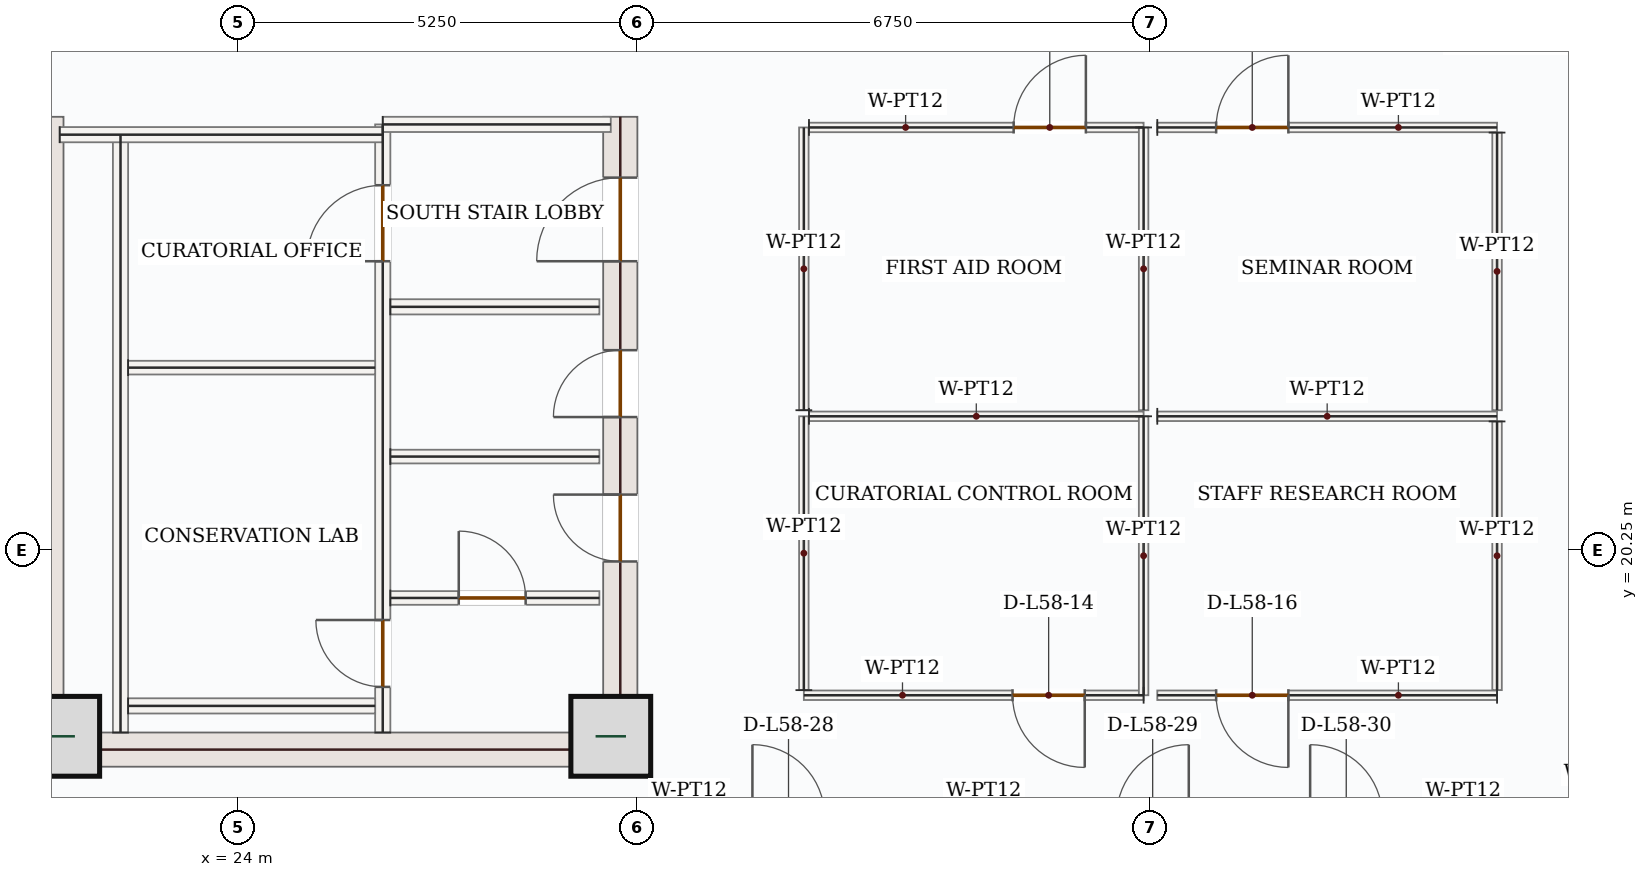
"""IFC4 building model, lengths in metres.
Left out: names, types, materials, properties, quantities, classifications, styles, units other than length and angle.
Written with IfcOpenShell. Run it as: python <this file> out.ifc"""

import sys

from ifc_helpers import new_model, si_unit, direction, frame, frame_2d, origin, origin_2d, place, context, subcontext, project, spatial, rectangle, extrude, source, transform, mapped, element, fill, save


model = new_model("IFC4")
c1 = context("Model", 3, precision=1e-05, world=origin(), true_north=direction((0.0, 1.0)))
c2 = subcontext(c1, "Body", "Model", "MODEL_VIEW")
j1 = project(units=[si_unit("LENGTHUNIT", "METRE"), si_unit("PLANEANGLEUNIT", "RADIAN")], contexts=[c1])
p1 = place(None, origin())
s1 = spatial("IfcSite", under=j1, at=p1, CompositionType="ELEMENT")
p2 = place(p1, origin())
s2 = spatial("IfcBuilding", under=s1, at=p2, CompositionType="ELEMENT")
p3 = place(p2, frame((0.0, 0.0, 246.6)))
s3 = spatial("IfcBuildingStorey", under=s2, at=p3, CompositionType="ELEMENT", Elevation=246.6)
m1 = source(origin(), c2, "Body", "SweptSolid", [
    extrude(rectangle(XDim=8.55, YDim=0.45, at=frame_2d((4.275, 0.0))), origin(), (0.0, 0.0, 1.0), 3.5),
])
p4 = place(p3, frame((21.475, 17.4, 0.0), z_axis=(0.0, 0.0, 1.0), x_axis=(0.0, 1.0, 0.0)))
e1 = element("IfcWall", 1, at=p4, inside=s3, PredefinedType="SHEAR", context=c2, shape_type="MappedRepresentation", body=[
    mapped(m1, transform((0.0, 0.0, 0.0), x_axis=(1.0, 0.0, 0.0), y_axis=(0.0, 1.0, 0.0), z_axis=(0.0, 0.0, 1.0), scale=1.0)),
])
p5 = place(p3, frame((29.025, 17.4, 0.0), z_axis=(0.0, 0.0, 1.0), x_axis=(0.0, 1.0, 0.0)))
e2 = element("IfcWall", 2, at=p5, inside=s3, PredefinedType="SHEAR", context=c2, shape_type="SweptSolid", body=[
    extrude(rectangle(XDim=8.55, YDim=0.45, at=frame_2d((4.275, 0.0))), origin(), (0.0, 0.0, 1.0), 3.5),
])
p6 = place(p5, frame((6.65, 0.0, 0.0)))
e3 = element("IfcOpeningElement", 3, at=p6, cuts=e2, PredefinedType="OPENING", context=c2, shape_type="SweptSolid", body=[
    extrude(rectangle(XDim=1.1, YDim=2.2, at=frame_2d((0.55, 1.1))), frame((0.0, 0.235, 0.0), z_axis=(0.0, -1.0, 0.0), x_axis=(1.0, 0.0, 0.0)), (0.0, 0.0, 1.0), 0.47),
])
p7 = place(p5, frame((2.7, 0.0, 0.0)))
e4 = element("IfcOpeningElement", 4, at=p7, cuts=e2, PredefinedType="OPENING", context=c2, shape_type="SweptSolid", body=[
    extrude(rectangle(XDim=0.88, YDim=2.1, at=frame_2d((0.44, 1.05))), frame((0.0, 0.235, 0.0), z_axis=(0.0, -1.0, 0.0), x_axis=(1.0, 0.0, 0.0)), (0.0, 0.0, 1.0), 0.47),
])
p8 = place(p5, frame((4.6, 0.0, 0.0)))
e5 = element("IfcOpeningElement", 5, at=p8, cuts=e2, PredefinedType="OPENING", context=c2, shape_type="SweptSolid", body=[
    extrude(rectangle(XDim=0.88, YDim=2.1, at=frame_2d((0.44, 1.05))), frame((0.0, 0.235, 0.0), z_axis=(0.0, -1.0, 0.0), x_axis=(1.0, 0.0, 0.0)), (0.0, 0.0, 1.0), 0.47),
])
m2 = source(origin(), c2, "Body", "SweptSolid", [
    extrude(rectangle(XDim=7.1, YDim=0.45, at=frame_2d((3.55, 0.0))), origin(), (0.0, 0.0, 1.0), 3.5),
])
p9 = place(p3, frame((21.7, 17.625, 0.0), z_axis=(0.0, 0.0, 1.0), x_axis=(1.0, 0.0, 0.0)))
e6 = element("IfcWall", 6, at=p9, inside=s3, PredefinedType="SHEAR", context=c2, shape_type="MappedRepresentation", body=[
    mapped(m2, transform((0.0, 0.0, 0.0), x_axis=(1.0, 0.0, 0.0), y_axis=(0.0, 1.0, 0.0), z_axis=(0.0, 0.0, 1.0), scale=1.0)),
])
m3 = source(origin(), c2, "Body", "SweptSolid", [
    extrude(rectangle(XDim=1.05, YDim=1.05, at=origin_2d()), origin(), (0.0, 0.0, 1.0), 3.75),
])
for number, where, z_axis, x_axis in (
    (7, (21.65, 17.8, 0.0), (0.0, 0.0, 1.0), (1.0, 0.0, 0.0)),
    (8, (28.9, 17.8, 0.0), (0.0, 0.0, 1.0), (1.0, 0.0, 0.0)),
):
    element("IfcColumn", number, at=place(p3, frame(where, z_axis=z_axis, x_axis=x_axis)), inside=s3, PredefinedType="COLUMN", context=c2, shape_type="MappedRepresentation", body=[
        mapped(m3, transform((0.0, 0.0, 0.0), x_axis=(1.0, 0.0, 0.0), y_axis=(0.0, 1.0, 0.0), z_axis=(0.0, 0.0, 1.0), scale=1.0)),
    ])
m4 = source(origin(), c2, "Body", "SweptSolid", [
    extrude(rectangle(XDim=7.87, YDim=0.2, at=frame_2d((3.935, 0.0))), origin(), (0.0, 0.0, 1.0), 3.5),
])
p10 = place(p3, frame((22.45, 17.85, 0.0), z_axis=(0.0, 0.0, 1.0), x_axis=(0.0, 1.0, 0.0)))
e9 = element("IfcWall", 9, at=p10, inside=s3, PredefinedType="SOLIDWALL", context=c2, shape_type="MappedRepresentation", body=[
    mapped(m4, transform((0.0, 0.0, 0.0), x_axis=(1.0, 0.0, 0.0), y_axis=(0.0, 1.0, 0.0), z_axis=(0.0, 0.0, 1.0), scale=1.0)),
])
p11 = place(p3, frame((25.9, 17.85, 0.0), z_axis=(0.0, 0.0, 1.0), x_axis=(0.0, 1.0, 0.0)))
e10 = element("IfcWall", 10, at=p11, inside=s3, PredefinedType="SOLIDWALL", context=c2, shape_type="SweptSolid", body=[
    extrude(rectangle(XDim=8.0, YDim=0.2, at=frame_2d((4.0, 0.0))), origin(), (0.0, 0.0, 1.0), 3.5),
])
p12 = place(p11, frame((6.2, 0.0, 0.0)))
e11 = element("IfcOpeningElement", 11, at=p12, cuts=e10, PredefinedType="OPENING", context=c2, shape_type="SweptSolid", body=[
    extrude(rectangle(XDim=1.0, YDim=2.15, at=frame_2d((0.5, 1.075))), frame((0.0, 0.11, 0.0), z_axis=(0.0, -1.0, 0.0), x_axis=(1.0, 0.0, 0.0)), (0.0, 0.0, 1.0), 0.22),
])
p13 = place(p11, frame((0.6, 0.0, 0.0)))
e12 = element("IfcOpeningElement", 12, at=p13, cuts=e10, PredefinedType="OPENING", context=c2, shape_type="SweptSolid", body=[
    extrude(rectangle(XDim=0.88, YDim=2.1, at=frame_2d((0.44, 1.05))), frame((0.0, 0.11, 0.0), z_axis=(0.0, -1.0, 0.0), x_axis=(1.0, 0.0, 0.0)), (0.0, 0.0, 1.0), 0.22),
])
m5 = source(origin(), c2, "Body", "SweptSolid", [
    extrude(rectangle(XDim=4.25, YDim=0.2, at=frame_2d((2.125, 0.0))), origin(), (0.0, 0.0, 1.0), 3.5),
])
p14 = place(p3, frame((21.65, 25.715, 0.0), z_axis=(0.0, 0.0, 1.0), x_axis=(1.0, 0.0, 0.0)))
e13 = element("IfcWall", 13, at=p14, inside=s3, PredefinedType="SOLIDWALL", context=c2, shape_type="MappedRepresentation", body=[
    mapped(m5, transform((0.0, 0.0, 0.0), x_axis=(1.0, 0.0, 0.0), y_axis=(0.0, 1.0, 0.0), z_axis=(0.0, 0.0, 1.0), scale=1.0)),
])
m6 = source(origin(), c2, "Body", "SweptSolid", [
    extrude(rectangle(XDim=3.0, YDim=0.2, at=frame_2d((1.5, 0.0))), origin(), (0.0, 0.0, 1.0), 3.5),
])
p15 = place(p3, frame((25.9, 25.85, 0.0), z_axis=(0.0, 0.0, 1.0), x_axis=(1.0, 0.0, 0.0)))
e14 = element("IfcWall", 14, at=p15, inside=s3, PredefinedType="SOLIDWALL", context=c2, shape_type="MappedRepresentation", body=[
    mapped(m6, transform((0.0, 0.0, 0.0), x_axis=(1.0, 0.0, 0.0), y_axis=(0.0, 1.0, 0.0), z_axis=(0.0, 0.0, 1.0), scale=1.0)),
])
m7 = source(origin(), c2, "Body", "SweptSolid", [
    extrude(rectangle(XDim=3.25, YDim=0.2, at=frame_2d((1.625, 0.0))), origin(), (0.0, 0.0, 1.0), 3.5),
])
p16 = place(p3, frame((22.55, 18.2, 0.0), z_axis=(0.0, 0.0, 1.0), x_axis=(1.0, 0.0, 0.0)))
e15 = element("IfcWall", 15, at=p16, inside=s3, PredefinedType="SOLIDWALL", context=c2, shape_type="MappedRepresentation", body=[
    mapped(m7, transform((0.0, 0.0, 0.0), x_axis=(1.0, 0.0, 0.0), y_axis=(0.0, 1.0, 0.0), z_axis=(0.0, 0.0, 1.0), scale=1.0)),
])
m8 = source(origin(), c2, "Body", "SweptSolid", [
    extrude(rectangle(XDim=3.25, YDim=0.18, at=frame_2d((1.625, 0.0))), origin(), (0.0, 0.0, 1.0), 3.5),
])
p17 = place(p3, frame((22.55, 22.65, 0.0), z_axis=(0.0, 0.0, 1.0), x_axis=(1.0, 0.0, 0.0)))
e16 = element("IfcWall", 16, at=p17, inside=s3, PredefinedType="PARTITIONING", context=c2, shape_type="MappedRepresentation", body=[
    mapped(m8, transform((0.0, 0.0, 0.0), x_axis=(1.0, 0.0, 0.0), y_axis=(0.0, 1.0, 0.0), z_axis=(0.0, 0.0, 1.0), scale=1.0)),
])
m9 = source(origin(), c2, "Body", "SweptSolid", [
    extrude(rectangle(XDim=2.75, YDim=0.2, at=frame_2d((1.375, 0.0))), origin(), (0.0, 0.0, 1.0), 3.5),
])
p18 = place(p3, frame((26.0, 23.45, 0.0), z_axis=(0.0, 0.0, 1.0), x_axis=(1.0, 0.0, 0.0)))
e17 = element("IfcWall", 17, at=p18, inside=s3, PredefinedType="SOLIDWALL", context=c2, shape_type="MappedRepresentation", body=[
    mapped(m9, transform((0.0, 0.0, 0.0), x_axis=(1.0, 0.0, 0.0), y_axis=(0.0, 1.0, 0.0), z_axis=(0.0, 0.0, 1.0), scale=1.0)),
])
p19 = place(p3, frame((26.0, 19.62, 0.0), z_axis=(0.0, 0.0, 1.0), x_axis=(1.0, 0.0, 0.0)))
e18 = element("IfcWall", 18, at=p19, inside=s3, PredefinedType="PARTITIONING", context=c2, shape_type="SweptSolid", body=[
    extrude(rectangle(XDim=2.75, YDim=0.18, at=frame_2d((1.375, 0.0))), origin(), (0.0, 0.0, 1.0), 3.5),
])
p20 = place(p19, frame((0.9, 0.0, 0.0)))
e19 = element("IfcOpeningElement", 19, at=p20, cuts=e18, PredefinedType="OPENING", context=c2, shape_type="SweptSolid", body=[
    extrude(rectangle(XDim=0.88, YDim=2.1, at=frame_2d((0.44, 1.05))), frame((0.0, 0.1, 0.0), z_axis=(0.0, -1.0, 0.0), x_axis=(1.0, 0.0, 0.0)), (0.0, 0.0, 1.0), 0.2),
])
m10 = source(origin(), c2, "Body", "SweptSolid", [
    extrude(rectangle(XDim=2.75, YDim=0.18, at=frame_2d((1.375, 0.0))), origin(), (0.0, 0.0, 1.0), 3.5),
])
p21 = place(p3, frame((26.0, 21.48, 0.0), z_axis=(0.0, 0.0, 1.0), x_axis=(1.0, 0.0, 0.0)))
e20 = element("IfcWall", 20, at=p21, inside=s3, PredefinedType="PARTITIONING", context=c2, shape_type="MappedRepresentation", body=[
    mapped(m10, transform((0.0, 0.0, 0.0), x_axis=(1.0, 0.0, 0.0), y_axis=(0.0, 1.0, 0.0), z_axis=(0.0, 0.0, 1.0), scale=1.0)),
])
p22 = place(p3, frame((35.91, 18.34, 0.0), z_axis=(0.0, 0.0, 1.0), x_axis=(-1.0, 0.0, 0.0)))
e21 = element("IfcWall", 21, at=p22, inside=s3, PredefinedType="PARTITIONING", context=c2, shape_type="SweptSolid", body=[
    extrude(rectangle(XDim=4.47, YDim=0.125, at=frame_2d((2.235, 0.0))), origin(), (0.0, 0.0, 1.0), 3.5),
])
p23 = place(p22, frame((0.774, 0.0, 0.0)))
e22 = element("IfcOpeningElement", 22, at=p23, cuts=e21, PredefinedType="OPENING", context=c2, shape_type="SweptSolid", body=[
    extrude(rectangle(XDim=0.95, YDim=2.15, at=frame_2d((0.475, 1.075))), frame((0.0, 0.073, 0.0), z_axis=(0.0, -1.0, 0.0), x_axis=(1.0, 0.0, 0.0)), (0.0, 0.0, 1.0), 0.145),
])
m11 = source(origin(), c2, "Body", "SweptSolid", [
    extrude(rectangle(XDim=3.603, YDim=0.125, at=frame_2d((1.801, 0.0))), origin(), (0.0, 0.0, 1.0), 3.5),
])
p24 = place(p3, frame((31.44, 18.407, 0.0), z_axis=(0.0, 0.0, 1.0), x_axis=(0.0, 1.0, 0.0)))
e23 = element("IfcWall", 23, at=p24, inside=s3, PredefinedType="PARTITIONING", context=c2, shape_type="MappedRepresentation", body=[
    mapped(m11, transform((0.0, 0.0, 0.0), x_axis=(1.0, 0.0, 0.0), y_axis=(0.0, 1.0, 0.0), z_axis=(0.0, 0.0, 1.0), scale=1.0)),
])
m12 = source(origin(), c2, "Body", "SweptSolid", [
    extrude(rectangle(XDim=4.402, YDim=0.125, at=frame_2d((2.201, 0.0))), origin(), (0.0, 0.0, 1.0), 3.5),
])
p25 = place(p3, frame((31.508, 22.01, 0.0), z_axis=(0.0, 0.0, 1.0), x_axis=(1.0, 0.0, 0.0)))
e24 = element("IfcWall", 24, at=p25, inside=s3, PredefinedType="PARTITIONING", context=c2, shape_type="MappedRepresentation", body=[
    mapped(m12, transform((0.0, 0.0, 0.0), x_axis=(1.0, 0.0, 0.0), y_axis=(0.0, 1.0, 0.0), z_axis=(0.0, 0.0, 1.0), scale=1.0)),
])
m13 = source(origin(), c2, "Body", "SweptSolid", [
    extrude(rectangle(XDim=3.67, YDim=0.125, at=frame_2d((1.835, 0.0))), origin(), (0.0, 0.0, 1.0), 3.5),
])
p26 = place(p3, frame((35.91, 22.01, 0.0), z_axis=(0.0, 0.0, 1.0), x_axis=(0.0, -1.0, 0.0)))
e25 = element("IfcWall", 25, at=p26, inside=s3, PredefinedType="PARTITIONING", context=c2, shape_type="MappedRepresentation", body=[
    mapped(m13, transform((0.0, 0.0, 0.0), x_axis=(1.0, 0.0, 0.0), y_axis=(0.0, 1.0, 0.0), z_axis=(0.0, 0.0, 1.0), scale=1.0)),
])
p27 = place(p3, frame((40.56, 18.34, 0.0), z_axis=(0.0, 0.0, 1.0), x_axis=(-1.0, 0.0, 0.0)))
e26 = element("IfcWall", 26, at=p27, inside=s3, PredefinedType="PARTITIONING", context=c2, shape_type="SweptSolid", body=[
    extrude(rectangle(XDim=4.47, YDim=0.125, at=frame_2d((2.235, 0.0))), origin(), (0.0, 0.0, 1.0), 3.5),
])
p28 = place(p27, frame((2.746, 0.0, 0.0)))
e27 = element("IfcOpeningElement", 27, at=p28, cuts=e26, PredefinedType="OPENING", context=c2, shape_type="SweptSolid", body=[
    extrude(rectangle(XDim=0.95, YDim=2.15, at=frame_2d((0.475, 1.075))), frame((0.0, 0.073, 0.0), z_axis=(0.0, -1.0, 0.0), x_axis=(1.0, 0.0, 0.0)), (0.0, 0.0, 1.0), 0.145),
])
m14 = source(origin(), c2, "Body", "SweptSolid", [
    extrude(rectangle(XDim=4.47, YDim=0.125, at=frame_2d((2.235, 0.0))), origin(), (0.0, 0.0, 1.0), 3.5),
])
p29 = place(p3, frame((36.09, 22.01, 0.0), z_axis=(0.0, 0.0, 1.0), x_axis=(1.0, 0.0, 0.0)))
e28 = element("IfcWall", 28, at=p29, inside=s3, PredefinedType="PARTITIONING", context=c2, shape_type="MappedRepresentation", body=[
    mapped(m14, transform((0.0, 0.0, 0.0), x_axis=(1.0, 0.0, 0.0), y_axis=(0.0, 1.0, 0.0), z_axis=(0.0, 0.0, 1.0), scale=1.0)),
])
m15 = source(origin(), c2, "Body", "SweptSolid", [
    extrude(rectangle(XDim=3.535, YDim=0.125, at=frame_2d((1.768, 0.0))), origin(), (0.0, 0.0, 1.0), 3.5),
])
p30 = place(p3, frame((40.56, 21.942, 0.0), z_axis=(0.0, 0.0, 1.0), x_axis=(0.0, -1.0, 0.0)))
e29 = element("IfcWall", 29, at=p30, inside=s3, PredefinedType="PARTITIONING", context=c2, shape_type="MappedRepresentation", body=[
    mapped(m15, transform((0.0, 0.0, 0.0), x_axis=(1.0, 0.0, 0.0), y_axis=(0.0, 1.0, 0.0), z_axis=(0.0, 0.0, 1.0), scale=1.0)),
])
m16 = source(origin(), c2, "Body", "SweptSolid", [
    extrude(rectangle(XDim=3.72, YDim=0.125, at=frame_2d((1.86, 0.0))), origin(), (0.0, 0.0, 1.0), 3.5),
])
p31 = place(p3, frame((31.44, 22.09, 0.0), z_axis=(0.0, 0.0, 1.0), x_axis=(0.0, 1.0, 0.0)))
e30 = element("IfcWall", 30, at=p31, inside=s3, PredefinedType="PARTITIONING", context=c2, shape_type="MappedRepresentation", body=[
    mapped(m16, transform((0.0, 0.0, 0.0), x_axis=(1.0, 0.0, 0.0), y_axis=(0.0, 1.0, 0.0), z_axis=(0.0, 0.0, 1.0), scale=1.0)),
])
p32 = place(p3, frame((31.508, 25.81, 0.0), z_axis=(0.0, 0.0, 1.0), x_axis=(1.0, 0.0, 0.0)))
e31 = element("IfcWall", 31, at=p32, inside=s3, PredefinedType="PARTITIONING", context=c2, shape_type="SweptSolid", body=[
    extrude(rectangle(XDim=4.402, YDim=0.125, at=frame_2d((2.201, 0.0))), origin(), (0.0, 0.0, 1.0), 3.5),
])
p33 = place(p32, frame((2.693, 0.0, 0.0)))
e32 = element("IfcOpeningElement", 32, at=p33, cuts=e31, PredefinedType="OPENING", context=c2, shape_type="SweptSolid", body=[
    extrude(rectangle(XDim=0.95, YDim=2.15, at=frame_2d((0.475, 1.075))), frame((0.0, 0.073, 0.0), z_axis=(0.0, -1.0, 0.0), x_axis=(1.0, 0.0, 0.0)), (0.0, 0.0, 1.0), 0.145),
])
p34 = place(p3, frame((35.91, 25.81, 0.0), z_axis=(0.0, 0.0, 1.0), x_axis=(0.0, -1.0, 0.0)))
e33 = element("IfcWall", 33, at=p34, inside=s3, PredefinedType="PARTITIONING", context=c2, shape_type="MappedRepresentation", body=[
    mapped(m16, transform((0.0, 0.0, 0.0), x_axis=(1.0, 0.0, 0.0), y_axis=(0.0, 1.0, 0.0), z_axis=(0.0, 0.0, 1.0), scale=1.0)),
])
p35 = place(p3, frame((36.09, 25.81, 0.0), z_axis=(0.0, 0.0, 1.0), x_axis=(1.0, 0.0, 0.0)))
e34 = element("IfcWall", 34, at=p35, inside=s3, PredefinedType="PARTITIONING", context=c2, shape_type="SweptSolid", body=[
    extrude(rectangle(XDim=4.47, YDim=0.125, at=frame_2d((2.235, 0.0))), origin(), (0.0, 0.0, 1.0), 3.5),
])
p36 = place(p35, frame((0.774, 0.0, 0.0)))
e35 = element("IfcOpeningElement", 35, at=p36, cuts=e34, PredefinedType="OPENING", context=c2, shape_type="SweptSolid", body=[
    extrude(rectangle(XDim=0.95, YDim=2.15, at=frame_2d((0.475, 1.075))), frame((0.0, 0.073, 0.0), z_axis=(0.0, -1.0, 0.0), x_axis=(1.0, 0.0, 0.0)), (0.0, 0.0, 1.0), 0.145),
])
m17 = source(origin(), c2, "Body", "SweptSolid", [
    extrude(rectangle(XDim=3.652, YDim=0.125, at=frame_2d((1.826, 0.0))), origin(), (0.0, 0.0, 1.0), 3.5),
])
p37 = place(p3, frame((40.56, 25.742, 0.0), z_axis=(0.0, 0.0, 1.0), x_axis=(0.0, -1.0, 0.0)))
e36 = element("IfcWall", 36, at=p37, inside=s3, PredefinedType="PARTITIONING", context=c2, shape_type="MappedRepresentation", body=[
    mapped(m17, transform((0.0, 0.0, 0.0), x_axis=(1.0, 0.0, 0.0), y_axis=(0.0, 1.0, 0.0), z_axis=(0.0, 0.0, 1.0), scale=1.0)),
])
m18 = source(origin(), c2, "Body", "SweptSolid", [
    extrude(rectangle(XDim=1.0, YDim=2.15, at=frame_2d((0.5, 1.075))), frame((0.0, 0.025, 0.0), z_axis=(0.0, -1.0, 0.0), x_axis=(1.0, 0.0, 0.0)), (0.0, 0.0, 1.0), 0.05),
])
p38 = place(p12, origin())
e37 = element("IfcDoor", 37, at=p38, inside=s3, OperationType="SINGLE_SWING_LEFT", PredefinedType="DOOR", context=c2, shape_type="MappedRepresentation", body=[
    mapped(m18, transform((0.0, 0.0, 0.0), x_axis=(1.0, 0.0, 0.0), y_axis=(0.0, 1.0, 0.0), z_axis=(0.0, 0.0, 1.0), scale=1.0)),
])
fill(e11, e37)
m19 = source(origin(), c2, "Body", "SweptSolid", [
    extrude(rectangle(XDim=0.88, YDim=2.1, at=frame_2d((0.44, 1.05))), frame((0.0, 0.025, 0.0), z_axis=(0.0, -1.0, 0.0), x_axis=(1.0, 0.0, 0.0)), (0.0, 0.0, 1.0), 0.05),
])
p39 = place(p13, origin())
e38 = element("IfcDoor", 38, at=p39, inside=s3, OperationType="SINGLE_SWING_RIGHT", PredefinedType="DOOR", context=c2, shape_type="MappedRepresentation", body=[
    mapped(m19, transform((0.0, 0.0, 0.0), x_axis=(1.0, 0.0, 0.0), y_axis=(0.0, 1.0, 0.0), z_axis=(0.0, 0.0, 1.0), scale=1.0)),
])
fill(e12, e38)
m20 = source(origin(), c2, "Body", "SweptSolid", [
    extrude(rectangle(XDim=1.1, YDim=2.2, at=frame_2d((0.55, 1.1))), frame((0.0, 0.025, 0.0), z_axis=(0.0, -1.0, 0.0), x_axis=(1.0, 0.0, 0.0)), (0.0, 0.0, 1.0), 0.05),
])
p40 = place(p6, origin())
e39 = element("IfcDoor", 39, at=p40, inside=s3, OperationType="SINGLE_SWING_LEFT", PredefinedType="DOOR", context=c2, shape_type="MappedRepresentation", body=[
    mapped(m20, transform((0.0, 0.0, 0.0), x_axis=(1.0, 0.0, 0.0), y_axis=(0.0, 1.0, 0.0), z_axis=(0.0, 0.0, 1.0), scale=1.0)),
])
fill(e3, e39)
p41 = place(p20, origin())
e40 = element("IfcDoor", 40, at=p41, inside=s3, OperationType="SINGLE_SWING_LEFT", PredefinedType="DOOR", context=c2, shape_type="MappedRepresentation", body=[
    mapped(m19, transform((0.0, 0.0, 0.0), x_axis=(1.0, 0.0, 0.0), y_axis=(0.0, 1.0, 0.0), z_axis=(0.0, 0.0, 1.0), scale=1.0)),
])
fill(e19, e40)
p42 = place(p7, origin())
e41 = element("IfcDoor", 41, at=p42, inside=s3, OperationType="SINGLE_SWING_RIGHT", PredefinedType="DOOR", context=c2, shape_type="MappedRepresentation", body=[
    mapped(m19, transform((0.0, 0.0, 0.0), x_axis=(1.0, 0.0, 0.0), y_axis=(0.0, 1.0, 0.0), z_axis=(0.0, 0.0, 1.0), scale=1.0)),
])
fill(e4, e41)
p43 = place(p8, origin())
e42 = element("IfcDoor", 42, at=p43, inside=s3, OperationType="SINGLE_SWING_LEFT", PredefinedType="DOOR", context=c2, shape_type="MappedRepresentation", body=[
    mapped(m19, transform((0.0, 0.0, 0.0), x_axis=(1.0, 0.0, 0.0), y_axis=(0.0, 1.0, 0.0), z_axis=(0.0, 0.0, 1.0), scale=1.0)),
])
fill(e5, e42)
m21 = source(origin(), c2, "Body", "SweptSolid", [
    extrude(rectangle(XDim=0.95, YDim=2.15, at=frame_2d((0.475, 1.075))), frame((0.0, 0.025, 0.0), z_axis=(0.0, -1.0, 0.0), x_axis=(1.0, 0.0, 0.0)), (0.0, 0.0, 1.0), 0.05),
])
p44 = place(p23, origin())
e43 = element("IfcDoor", 43, at=p44, inside=s3, OperationType="SINGLE_SWING_LEFT", PredefinedType="DOOR", context=c2, shape_type="MappedRepresentation", body=[
    mapped(m21, transform((0.0, 0.0, 0.0), x_axis=(1.0, 0.0, 0.0), y_axis=(0.0, 1.0, 0.0), z_axis=(0.0, 0.0, 1.0), scale=1.0)),
])
fill(e22, e43)
p45 = place(p33, origin())
e44 = element("IfcDoor", 44, at=p45, inside=s3, OperationType="SINGLE_SWING_RIGHT", PredefinedType="DOOR", context=c2, shape_type="MappedRepresentation", body=[
    mapped(m21, transform((0.0, 0.0, 0.0), x_axis=(1.0, 0.0, 0.0), y_axis=(0.0, 1.0, 0.0), z_axis=(0.0, 0.0, 1.0), scale=1.0)),
])
fill(e32, e44)
p46 = place(p28, origin())
e45 = element("IfcDoor", 45, at=p46, inside=s3, OperationType="SINGLE_SWING_LEFT", PredefinedType="DOOR", context=c2, shape_type="MappedRepresentation", body=[
    mapped(m21, transform((0.0, 0.0, 0.0), x_axis=(1.0, 0.0, 0.0), y_axis=(0.0, 1.0, 0.0), z_axis=(0.0, 0.0, 1.0), scale=1.0)),
])
fill(e27, e45)
p47 = place(p36, origin())
e46 = element("IfcDoor", 46, at=p47, inside=s3, OperationType="SINGLE_SWING_RIGHT", PredefinedType="DOOR", context=c2, shape_type="MappedRepresentation", body=[
    mapped(m21, transform((0.0, 0.0, 0.0), x_axis=(1.0, 0.0, 0.0), y_axis=(0.0, 1.0, 0.0), z_axis=(0.0, 0.0, 1.0), scale=1.0)),
])
fill(e35, e46)
save(model, sys.argv[1])
